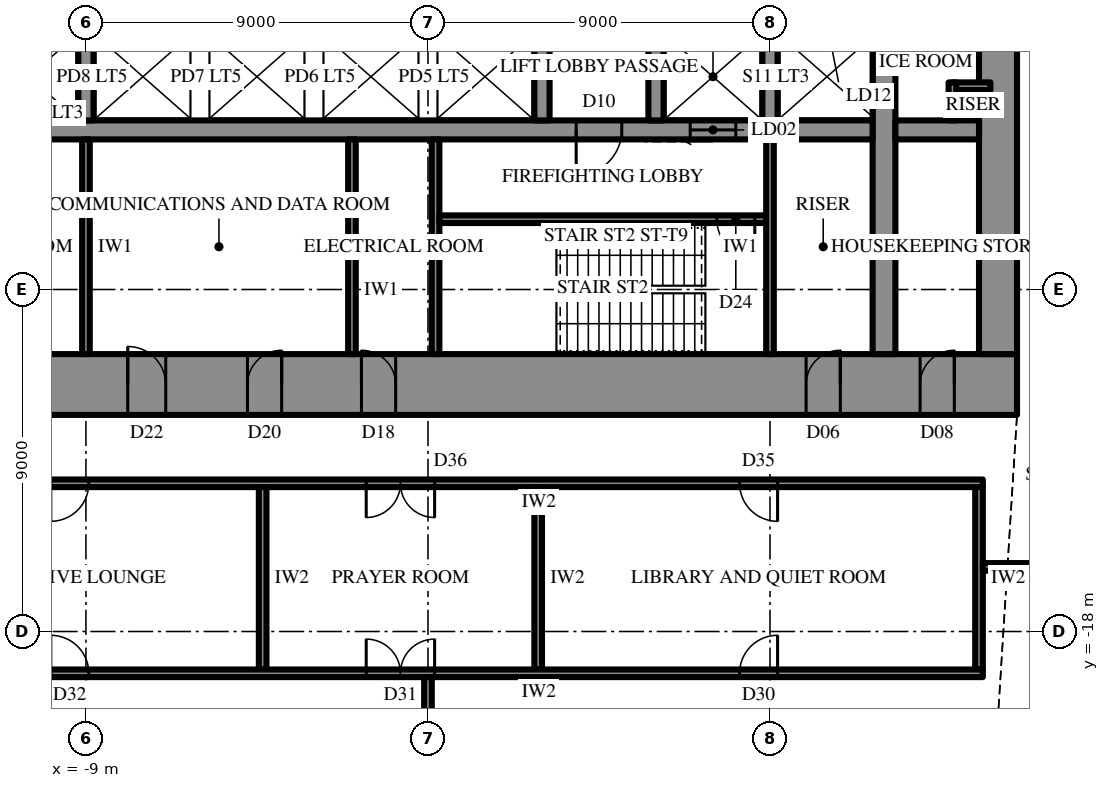
"""IFC4 building model, lengths in metres.
Left out: names, types, materials, properties, quantities, classifications, styles, units other than length and angle.
Written with IfcOpenShell. Run it as: python <this file> out.ifc"""

import sys

from ifc_helpers import new_model, si_unit, direction, frame, frame_2d, origin, place, context, subcontext, project, spatial, rectangle, extrude, element, fill, save


model = new_model("IFC4")
c1 = context("Model", 3, precision=1e-05, world=origin(), true_north=direction((0.0, 1.0)))
c2 = subcontext(c1, "Body", "Model", "MODEL_VIEW")
j1 = project(units=[si_unit("LENGTHUNIT", "METRE"), si_unit("PLANEANGLEUNIT", "RADIAN")], contexts=[c1])
p1 = place(None, origin())
s1 = spatial("IfcSite", under=j1, at=p1, CompositionType="ELEMENT")
p2 = place(p1, origin())
s2 = spatial("IfcBuilding", under=s1, at=p2, CompositionType="ELEMENT")
p3 = place(p2, frame((0.0, 0.0, 306.5)))
s3 = spatial("IfcBuildingStorey", under=s2, at=p3, CompositionType="ELEMENT", Elevation=306.5)
p4 = place(p3, frame((15.5, -11.5, 0.0), z_axis=(0.0, 0.0, 1.0), x_axis=(-1.0, 0.0, 0.0)))
e1 = element("IfcWall", 1, at=p4, inside=s3, PredefinedType="SHEAR", context=c2, shape_type="SweptSolid", body=[
    extrude(rectangle(XDim=31.0, YDim=1.6, at=frame_2d((15.5, 0.0))), origin(), (0.0, 0.0, 1.0), 5.0),
])
p5 = place(p4, frame((16.35, 0.0, 0.0)))
e2 = element("IfcOpeningElement", 2, at=p5, cuts=e1, PredefinedType="OPENING", context=c2, shape_type="SweptSolid", body=[
    extrude(rectangle(XDim=0.9, YDim=2.2, at=frame_2d((0.45, 1.1))), frame((0.0, 0.81, 0.0), z_axis=(0.0, -1.0, 0.0), x_axis=(1.0, 0.0, 0.0)), (0.0, 0.0, 1.0), 1.62),
])
p6 = place(p4, frame((19.35, 0.0, 0.0)))
e3 = element("IfcOpeningElement", 3, at=p6, cuts=e1, PredefinedType="OPENING", context=c2, shape_type="SweptSolid", body=[
    extrude(rectangle(XDim=0.9, YDim=2.2, at=frame_2d((0.45, 1.1))), frame((0.0, 0.81, 0.0), z_axis=(0.0, -1.0, 0.0), x_axis=(1.0, 0.0, 0.0)), (0.0, 0.0, 1.0), 1.62),
])
p7 = place(p4, frame((22.4, 0.0, 0.0)))
e4 = element("IfcOpeningElement", 4, at=p7, cuts=e1, PredefinedType="OPENING", context=c2, shape_type="SweptSolid", body=[
    extrude(rectangle(XDim=1.0, YDim=2.2, at=frame_2d((0.5, 1.1))), frame((0.0, 0.81, 0.0), z_axis=(0.0, -1.0, 0.0), x_axis=(1.0, 0.0, 0.0)), (0.0, 0.0, 1.0), 1.62),
])
p8 = place(p4, frame((1.65, 0.0, 0.0)))
e5 = element("IfcOpeningElement", 5, at=p8, cuts=e1, PredefinedType="OPENING", context=c2, shape_type="SweptSolid", body=[
    extrude(rectangle(XDim=0.9, YDim=2.2, at=frame_2d((0.45, 1.1))), frame((0.0, 0.81, 0.0), z_axis=(0.0, -1.0, 0.0), x_axis=(1.0, 0.0, 0.0)), (0.0, 0.0, 1.0), 1.62),
])
p9 = place(p4, frame((4.65, 0.0, 0.0)))
e6 = element("IfcOpeningElement", 6, at=p9, cuts=e1, PredefinedType="OPENING", context=c2, shape_type="SweptSolid", body=[
    extrude(rectangle(XDim=0.9, YDim=2.2, at=frame_2d((0.45, 1.1))), frame((0.0, 0.81, 0.0), z_axis=(0.0, -1.0, 0.0), x_axis=(1.0, 0.0, 0.0)), (0.0, 0.0, 1.0), 1.62),
])
p10 = place(p4, frame((25.45, 0.0, 0.0)))
e7 = element("IfcOpeningElement", 7, at=p10, cuts=e1, PredefinedType="OPENING", context=c2, shape_type="SweptSolid", body=[
    extrude(rectangle(XDim=0.9, YDim=2.2, at=frame_2d((0.45, 1.1))), frame((0.0, 0.81, 0.0), z_axis=(0.0, -1.0, 0.0), x_axis=(1.0, 0.0, 0.0)), (0.0, 0.0, 1.0), 1.62),
])
p11 = place(p4, frame((28.45, 0.0, 0.0)))
e8 = element("IfcOpeningElement", 8, at=p11, cuts=e1, PredefinedType="OPENING", context=c2, shape_type="SweptSolid", body=[
    extrude(rectangle(XDim=0.9, YDim=2.2, at=frame_2d((0.45, 1.1))), frame((0.0, 0.81, 0.0), z_axis=(0.0, -1.0, 0.0), x_axis=(1.0, 0.0, 0.0)), (0.0, 0.0, 1.0), 1.62),
])
p12 = place(p3, frame((15.0, -10.7, 0.0), z_axis=(0.0, 0.0, 1.0), x_axis=(0.0, 1.0, 0.0)))
e9 = element("IfcWall", 9, at=p12, inside=s3, PredefinedType="SHEAR", context=c2, shape_type="SweptSolid", body=[
    extrude(rectangle(XDim=21.4, YDim=1.0, at=frame_2d((10.7, 0.0))), origin(), (0.0, 0.0, 1.0), 5.0),
])
p13 = place(p12, frame((9.8, 0.0, 0.0)))
e10 = element("IfcOpeningElement", 10, at=p13, cuts=e9, PredefinedType="OPENING", context=c2, shape_type="SweptSolid", body=[
    extrude(rectangle(XDim=1.8, YDim=2.4, at=frame_2d((0.9, 1.2))), frame((0.0, 0.51, 0.0), z_axis=(0.0, -1.0, 0.0), x_axis=(1.0, 0.0, 0.0)), (0.0, 0.0, 1.0), 1.02),
])
p14 = place(p3, frame((12.0, -10.7, 0.0), z_axis=(0.0, 0.0, 1.0), x_axis=(0.0, 1.0, 0.0)))
e11 = element("IfcWall", 11, at=p14, inside=s3, PredefinedType="SHEAR", context=c2, shape_type="SweptSolid", body=[
    extrude(rectangle(XDim=21.4, YDim=0.6, at=frame_2d((10.7, 0.0))), origin(), (0.0, 0.0, 1.0), 5.0),
])
p15 = place(p14, frame((9.8, 0.0, 0.0)))
e12 = element("IfcOpeningElement", 12, at=p15, cuts=e11, PredefinedType="OPENING", context=c2, shape_type="SweptSolid", body=[
    extrude(rectangle(XDim=1.8, YDim=2.4, at=frame_2d((0.9, 1.2))), frame((0.0, 0.31, 0.0), z_axis=(0.0, -1.0, 0.0), x_axis=(1.0, 0.0, 0.0)), (0.0, 0.0, 1.0), 0.62),
])
p16 = place(p3, frame((14.5, -4.8, 0.0), z_axis=(0.0, 0.0, 1.0), x_axis=(-1.0, 0.0, 0.0)))
e13 = element("IfcWall", 13, at=p16, inside=s3, PredefinedType="SHEAR", context=c2, shape_type="SweptSolid", body=[
    extrude(rectangle(XDim=2.2, YDim=0.5, at=frame_2d((1.1, 0.0))), origin(), (0.0, 0.0, 1.0), 5.0),
])
p17 = place(p3, frame((11.7, -4.8, 0.0), z_axis=(0.0, 0.0, 1.0), x_axis=(-1.0, 0.0, 0.0)))
e14 = element("IfcWall", 14, at=p17, inside=s3, PredefinedType="SHEAR", context=c2, shape_type="SweptSolid", body=[
    extrude(rectangle(XDim=23.4, YDim=0.5, at=frame_2d((11.7, 0.0))), origin(), (0.0, 0.0, 1.0), 5.0),
])
p18 = place(p17, frame((6.6, 0.0, 0.0)))
e15 = element("IfcOpeningElement", 15, at=p18, cuts=e14, PredefinedType="OPENING", context=c2, shape_type="SweptSolid", body=[
    extrude(rectangle(XDim=1.2, YDim=2.2, at=frame_2d((0.6, 1.1))), frame((0.0, 0.26, 0.0), z_axis=(0.0, -1.0, 0.0), x_axis=(1.0, 0.0, 0.0)), (0.0, 0.0, 1.0), 0.52),
])
p19 = place(p17, frame((3.6, 0.0, 0.0)))
e16 = element("IfcOpeningElement", 16, at=p19, cuts=e14, PredefinedType="OPENING", context=c2, shape_type="SweptSolid", body=[
    extrude(rectangle(XDim=1.2, YDim=2.2, at=frame_2d((0.6, 1.1))), frame((0.0, 0.26, 0.0), z_axis=(0.0, -1.0, 0.0), x_axis=(1.0, 0.0, 0.0)), (0.0, 0.0, 1.0), 0.52),
])
for number, where, z_axis, x_axis in (
    (17, (9.0, -2.25, 0.0), (0.0, 0.0, 1.0), (0.0, -1.0, 0.0)),
    (18, (6.0, -2.25, 0.0), (0.0, 0.0, 1.0), (0.0, -1.0, 0.0)),
    (19, (3.0, -2.25, 0.0), (0.0, 0.0, 1.0), (0.0, -1.0, 0.0)),
    (20, (-9.0, -2.25, 0.0), (0.0, 0.0, 1.0), (0.0, -1.0, 0.0)),
):
    element("IfcWall", number, at=place(p3, frame(where, z_axis=z_axis, x_axis=x_axis)), inside=s3, PredefinedType="SHEAR", context=c2, shape_type="SweptSolid", body=[
        extrude(rectangle(XDim=2.3, YDim=0.4, at=frame_2d((1.15, 0.0))), origin(), (0.0, 0.0, 1.0), 5.0),
    ])
p20 = place(p3, frame((0.2, -5.05, 0.0), z_axis=(0.0, 0.0, 1.0), x_axis=(0.0, -1.0, 0.0)))
e21 = element("IfcWall", 21, at=p20, inside=s3, PredefinedType="SHEAR", context=c2, shape_type="SweptSolid", body=[
    extrude(rectangle(XDim=5.65, YDim=0.2, at=frame_2d((2.825, 0.0))), origin(), (0.0, 0.0, 1.0), 5.0),
])
p21 = place(p3, frame((8.9, -7.15, 0.0), z_axis=(0.0, 0.0, 1.0), x_axis=(-1.0, 0.0, 0.0)))
e22 = element("IfcWall", 22, at=p21, inside=s3, PredefinedType="SHEAR", context=c2, shape_type="SweptSolid", body=[
    extrude(rectangle(XDim=8.6, YDim=0.2, at=frame_2d((4.3, 0.0))), origin(), (0.0, 0.0, 1.0), 5.0),
])
p22 = place(p21, frame((0.3, 0.0, 0.0)))
e23 = element("IfcOpeningElement", 23, at=p22, cuts=e22, PredefinedType="OPENING", context=c2, shape_type="SweptSolid", body=[
    extrude(rectangle(XDim=1.0, YDim=2.2, at=frame_2d((0.5, 1.1))), frame((0.0, 0.11, 0.0), z_axis=(0.0, -1.0, 0.0), x_axis=(1.0, 0.0, 0.0)), (0.0, 0.0, 1.0), 0.22),
])
for number, where, z_axis, x_axis in (
    (24, (9.0, -5.05, 0.0), (0.0, 0.0, 1.0), (0.0, -1.0, 0.0)),
    (25, (-9.0, -5.05, 0.0), (0.0, 0.0, 1.0), (0.0, -1.0, 0.0)),
    (26, (-2.0, -5.05, 0.0), (0.0, 0.0, 1.0), (0.0, -1.0, 0.0)),
):
    element("IfcWall", number, at=place(p3, frame(where, z_axis=z_axis, x_axis=x_axis)), inside=s3, PredefinedType="PARTITIONING", context=c2, shape_type="SweptSolid", body=[
        extrude(rectangle(XDim=5.65, YDim=0.2, at=frame_2d((2.825, 0.0))), origin(), (0.0, 0.0, 1.0), 4.8),
    ])
for number, where, z_axis, x_axis in (
    (27, (14.8, -3.65, 0.0), (0.0, 0.0, 1.0), (-1.0, 0.0, 0.0)),
    (28, (13.8, -3.55, 0.0), (0.0, 0.0, 1.0), (0.0, -1.0, 0.0)),
):
    element("IfcWall", number, at=place(p3, frame(where, z_axis=z_axis, x_axis=x_axis)), inside=s3, PredefinedType="PARTITIONING", context=c2, shape_type="SweptSolid", body=[
        extrude(rectangle(XDim=1.0, YDim=0.2, at=frame_2d((0.5, 0.0))), origin(), (0.0, 0.0, 1.0), 4.8),
    ])
p23 = place(p3, frame((14.6, -14.1, 0.0), z_axis=(0.0, 0.0, 1.0), x_axis=(-1.0, 0.0, 0.0)))
e29 = element("IfcWall", 29, at=p23, inside=s3, PredefinedType="PARTITIONING", context=c2, shape_type="SweptSolid", body=[
    extrude(rectangle(XDim=29.2, YDim=0.2, at=frame_2d((14.6, 0.0))), origin(), (0.0, 0.0, 1.0), 4.8),
])
p24 = place(p23, frame((5.4, 0.0, 0.0)))
e30 = element("IfcOpeningElement", 30, at=p24, cuts=e29, PredefinedType="OPENING", context=c2, shape_type="SweptSolid", body=[
    extrude(rectangle(XDim=1.0, YDim=2.2, at=frame_2d((0.5, 1.1))), frame((0.0, 0.11, 0.0), z_axis=(0.0, -1.0, 0.0), x_axis=(1.0, 0.0, 0.0)), (0.0, 0.0, 1.0), 0.22),
])
p25 = place(p23, frame((14.425, 0.0, 0.0)))
e31 = element("IfcOpeningElement", 31, at=p25, cuts=e29, PredefinedType="OPENING", context=c2, shape_type="SweptSolid", body=[
    extrude(rectangle(XDim=1.8, YDim=2.4, at=frame_2d((0.9, 1.2))), frame((0.0, 0.11, 0.0), z_axis=(0.0, -1.0, 0.0), x_axis=(1.0, 0.0, 0.0)), (0.0, 0.0, 1.0), 0.22),
])
p26 = place(p23, frame((23.525, 0.0, 0.0)))
e32 = element("IfcOpeningElement", 32, at=p26, cuts=e29, PredefinedType="OPENING", context=c2, shape_type="SweptSolid", body=[
    extrude(rectangle(XDim=1.0, YDim=2.2, at=frame_2d((0.5, 1.1))), frame((0.0, 0.11, 0.0), z_axis=(0.0, -1.0, 0.0), x_axis=(1.0, 0.0, 0.0)), (0.0, 0.0, 1.0), 0.22),
])
for number, where, z_axis, x_axis in (
    (33, (14.5, -14.2, 0.0), (0.0, 0.0, 1.0), (0.0, -1.0, 0.0)),
    (34, (2.9, -14.2, 0.0), (0.0, 0.0, 1.0), (0.0, -1.0, 0.0)),
):
    element("IfcWall", number, at=place(p3, frame(where, z_axis=z_axis, x_axis=x_axis)), inside=s3, PredefinedType="PARTITIONING", context=c2, shape_type="SweptSolid", body=[
        extrude(rectangle(XDim=4.8, YDim=0.2, at=frame_2d((2.4, 0.0))), origin(), (0.0, 0.0, 1.0), 4.8),
    ])
p27 = place(p3, frame((-4.35, -14.2, 0.0), z_axis=(0.0, 0.0, 1.0), x_axis=(0.0, -1.0, 0.0)))
e35 = element("IfcWall", 35, at=p27, inside=s3, PredefinedType="PARTITIONING", context=c2, shape_type="SweptSolid", body=[
    extrude(rectangle(XDim=4.8, YDim=0.2, at=frame_2d((2.4, 0.0))), origin(), (0.0, 0.0, 1.0), 3.792),
])
p28 = place(p3, frame((14.6, -19.1, 0.0), z_axis=(0.0, 0.0, 1.0), x_axis=(-1.0, 0.0, 0.0)))
e36 = element("IfcWall", 36, at=p28, inside=s3, PredefinedType="PARTITIONING", context=c2, shape_type="SweptSolid", body=[
    extrude(rectangle(XDim=29.2, YDim=0.2, at=frame_2d((14.6, 0.0))), origin(), (0.0, 0.0, 1.0), 4.8),
])
p29 = place(p28, frame((5.4, 0.0, 0.0)))
e37 = element("IfcOpeningElement", 37, at=p29, cuts=e36, PredefinedType="OPENING", context=c2, shape_type="SweptSolid", body=[
    extrude(rectangle(XDim=1.0, YDim=2.2, at=frame_2d((0.5, 1.1))), frame((0.0, 0.11, 0.0), z_axis=(0.0, -1.0, 0.0), x_axis=(1.0, 0.0, 0.0)), (0.0, 0.0, 1.0), 0.22),
])
p30 = place(p28, frame((14.425, 0.0, 0.0)))
e38 = element("IfcOpeningElement", 38, at=p30, cuts=e36, PredefinedType="OPENING", context=c2, shape_type="SweptSolid", body=[
    extrude(rectangle(XDim=1.8, YDim=2.4, at=frame_2d((0.9, 1.2))), frame((0.0, 0.11, 0.0), z_axis=(0.0, -1.0, 0.0), x_axis=(1.0, 0.0, 0.0)), (0.0, 0.0, 1.0), 0.22),
])
p31 = place(p28, frame((23.525, 0.0, 0.0)))
e39 = element("IfcOpeningElement", 39, at=p31, cuts=e36, PredefinedType="OPENING", context=c2, shape_type="SweptSolid", body=[
    extrude(rectangle(XDim=1.0, YDim=2.2, at=frame_2d((0.5, 1.1))), frame((0.0, 0.11, 0.0), z_axis=(0.0, -1.0, 0.0), x_axis=(1.0, 0.0, 0.0)), (0.0, 0.0, 1.0), 0.22),
])
p32 = place(p3, frame((14.6, -16.3, 0.0), z_axis=(0.0, 0.0, 1.0), x_axis=(1.0, 0.0, 0.0)))
e40 = element("IfcWall", 40, at=p32, inside=s3, PredefinedType="PARTITIONING", context=c2, shape_type="SweptSolid", body=[
    extrude(rectangle(XDim=4.8, YDim=0.2, at=frame_2d((2.4, 0.0))), origin(), (0.0, 0.0, 1.0), 4.8),
])
p33 = place(p3, frame((0.0, -19.2, 0.0), z_axis=(0.0, 0.0, 1.0), x_axis=(0.0, -1.0, 0.0)))
e41 = element("IfcWall", 41, at=p33, inside=s3, PredefinedType="PARTITIONING", context=c2, shape_type="SweptSolid", body=[
    extrude(rectangle(XDim=7.36, YDim=0.2, at=frame_2d((3.68, 0.0))), origin(), (0.0, 0.0, 1.0), 3.792),
])
p34 = place(p18, origin())
e42 = element("IfcDoor", 42, at=p34, inside=s3, OperationType="SINGLE_SWING_LEFT", PredefinedType="DOOR", context=c2, shape_type="SweptSolid", body=[
    extrude(rectangle(XDim=1.2, YDim=2.2, at=frame_2d((0.6, 1.1))), frame((0.0, 0.025, 0.0), z_axis=(0.0, -1.0, 0.0), x_axis=(1.0, 0.0, 0.0)), (0.0, 0.0, 1.0), 0.05),
])
fill(e15, e42)
p35 = place(p22, origin())
e43 = element("IfcDoor", 43, at=p35, inside=s3, OperationType="SINGLE_SWING_RIGHT", PredefinedType="DOOR", context=c2, shape_type="SweptSolid", body=[
    extrude(rectangle(XDim=1.0, YDim=2.2, at=frame_2d((0.5, 1.1))), frame((0.0, 0.025, 0.0), z_axis=(0.0, -1.0, 0.0), x_axis=(1.0, 0.0, 0.0)), (0.0, 0.0, 1.0), 0.05),
])
fill(e23, e43)
p36 = place(p5, frame((0.9, 0.0, 0.0), z_axis=(0.0, 0.0, 1.0), x_axis=(-1.0, 0.0, 0.0)))
e44 = element("IfcDoor", 44, at=p36, inside=s3, OperationType="SINGLE_SWING_RIGHT", PredefinedType="DOOR", context=c2, shape_type="SweptSolid", body=[
    extrude(rectangle(XDim=0.9, YDim=2.2, at=frame_2d((0.45, 1.1))), frame((0.0, 0.025, 0.0), z_axis=(0.0, -1.0, 0.0), x_axis=(1.0, 0.0, 0.0)), (0.0, 0.0, 1.0), 0.05),
])
fill(e2, e44)
p37 = place(p6, frame((0.9, 0.0, 0.0), z_axis=(0.0, 0.0, 1.0), x_axis=(-1.0, 0.0, 0.0)))
e45 = element("IfcDoor", 45, at=p37, inside=s3, OperationType="SINGLE_SWING_LEFT", PredefinedType="DOOR", context=c2, shape_type="SweptSolid", body=[
    extrude(rectangle(XDim=0.9, YDim=2.2, at=frame_2d((0.45, 1.1))), frame((0.0, 0.025, 0.0), z_axis=(0.0, -1.0, 0.0), x_axis=(1.0, 0.0, 0.0)), (0.0, 0.0, 1.0), 0.05),
])
fill(e3, e45)
p38 = place(p7, frame((1.0, 0.0, 0.0), z_axis=(0.0, 0.0, 1.0), x_axis=(-1.0, 0.0, 0.0)))
e46 = element("IfcDoor", 46, at=p38, inside=s3, OperationType="SINGLE_SWING_RIGHT", PredefinedType="DOOR", context=c2, shape_type="SweptSolid", body=[
    extrude(rectangle(XDim=1.0, YDim=2.2, at=frame_2d((0.5, 1.1))), frame((0.0, 0.025, 0.0), z_axis=(0.0, -1.0, 0.0), x_axis=(1.0, 0.0, 0.0)), (0.0, 0.0, 1.0), 0.05),
])
fill(e4, e46)
p39 = place(p8, frame((0.9, 0.0, 0.0), z_axis=(0.0, 0.0, 1.0), x_axis=(-1.0, 0.0, 0.0)))
e47 = element("IfcDoor", 47, at=p39, inside=s3, OperationType="SINGLE_SWING_LEFT", PredefinedType="DOOR", context=c2, shape_type="SweptSolid", body=[
    extrude(rectangle(XDim=0.9, YDim=2.2, at=frame_2d((0.45, 1.1))), frame((0.0, 0.025, 0.0), z_axis=(0.0, -1.0, 0.0), x_axis=(1.0, 0.0, 0.0)), (0.0, 0.0, 1.0), 0.05),
])
fill(e5, e47)
p40 = place(p9, frame((0.9, 0.0, 0.0), z_axis=(0.0, 0.0, 1.0), x_axis=(-1.0, 0.0, 0.0)))
e48 = element("IfcDoor", 48, at=p40, inside=s3, OperationType="SINGLE_SWING_LEFT", PredefinedType="DOOR", context=c2, shape_type="SweptSolid", body=[
    extrude(rectangle(XDim=0.9, YDim=2.2, at=frame_2d((0.45, 1.1))), frame((0.0, 0.025, 0.0), z_axis=(0.0, -1.0, 0.0), x_axis=(1.0, 0.0, 0.0)), (0.0, 0.0, 1.0), 0.05),
])
fill(e6, e48)
p41 = place(p19, origin())
e49 = element("IfcDoor", 49, at=p41, inside=s3, OperationType="SLIDING_TO_LEFT", PredefinedType="DOOR", context=c2, shape_type="SweptSolid", body=[
    extrude(rectangle(XDim=1.2, YDim=2.2, at=frame_2d((0.6, 1.1))), frame((0.0, 0.025, 0.0), z_axis=(0.0, -1.0, 0.0), x_axis=(1.0, 0.0, 0.0)), (0.0, 0.0, 1.0), 0.05),
])
fill(e16, e49)
p42 = place(p29, frame((1.0, 0.0, 0.0), z_axis=(0.0, 0.0, 1.0), x_axis=(-1.0, 0.0, 0.0)))
e50 = element("IfcDoor", 50, at=p42, inside=s3, OperationType="SINGLE_SWING_LEFT", PredefinedType="DOOR", context=c2, shape_type="SweptSolid", body=[
    extrude(rectangle(XDim=1.0, YDim=2.2, at=frame_2d((0.5, 1.1))), frame((0.0, 0.025, 0.0), z_axis=(0.0, -1.0, 0.0), x_axis=(1.0, 0.0, 0.0)), (0.0, 0.0, 1.0), 0.05),
])
fill(e37, e50)
p43 = place(p30, frame((1.8, 0.0, 0.0), z_axis=(0.0, 0.0, 1.0), x_axis=(-1.0, 0.0, 0.0)))
e51 = element("IfcDoor", 51, at=p43, inside=s3, OperationType="DOUBLE_DOOR_SINGLE_SWING", PredefinedType="DOOR", context=c2, shape_type="SweptSolid", body=[
    extrude(rectangle(XDim=1.8, YDim=2.4, at=frame_2d((0.9, 1.2))), frame((0.0, 0.025, 0.0), z_axis=(0.0, -1.0, 0.0), x_axis=(1.0, 0.0, 0.0)), (0.0, 0.0, 1.0), 0.05),
])
fill(e38, e51)
p44 = place(p31, frame((1.0, 0.0, 0.0), z_axis=(0.0, 0.0, 1.0), x_axis=(-1.0, 0.0, 0.0)))
e52 = element("IfcDoor", 52, at=p44, inside=s3, OperationType="SINGLE_SWING_RIGHT", PredefinedType="DOOR", context=c2, shape_type="SweptSolid", body=[
    extrude(rectangle(XDim=1.0, YDim=2.2, at=frame_2d((0.5, 1.1))), frame((0.0, 0.025, 0.0), z_axis=(0.0, -1.0, 0.0), x_axis=(1.0, 0.0, 0.0)), (0.0, 0.0, 1.0), 0.05),
])
fill(e39, e52)
p45 = place(p24, origin())
e53 = element("IfcDoor", 53, at=p45, inside=s3, OperationType="SINGLE_SWING_RIGHT", PredefinedType="DOOR", context=c2, shape_type="SweptSolid", body=[
    extrude(rectangle(XDim=1.0, YDim=2.2, at=frame_2d((0.5, 1.1))), frame((0.0, 0.025, 0.0), z_axis=(0.0, -1.0, 0.0), x_axis=(1.0, 0.0, 0.0)), (0.0, 0.0, 1.0), 0.05),
])
fill(e30, e53)
p46 = place(p25, origin())
e54 = element("IfcDoor", 54, at=p46, inside=s3, OperationType="DOUBLE_DOOR_SINGLE_SWING", PredefinedType="DOOR", context=c2, shape_type="SweptSolid", body=[
    extrude(rectangle(XDim=1.8, YDim=2.4, at=frame_2d((0.9, 1.2))), frame((0.0, 0.025, 0.0), z_axis=(0.0, -1.0, 0.0), x_axis=(1.0, 0.0, 0.0)), (0.0, 0.0, 1.0), 0.05),
])
fill(e31, e54)
p47 = place(p26, origin())
e55 = element("IfcDoor", 55, at=p47, inside=s3, OperationType="SINGLE_SWING_LEFT", PredefinedType="DOOR", context=c2, shape_type="SweptSolid", body=[
    extrude(rectangle(XDim=1.0, YDim=2.2, at=frame_2d((0.5, 1.1))), frame((0.0, 0.025, 0.0), z_axis=(0.0, -1.0, 0.0), x_axis=(1.0, 0.0, 0.0)), (0.0, 0.0, 1.0), 0.05),
])
fill(e32, e55)
save(model, sys.argv[1])
